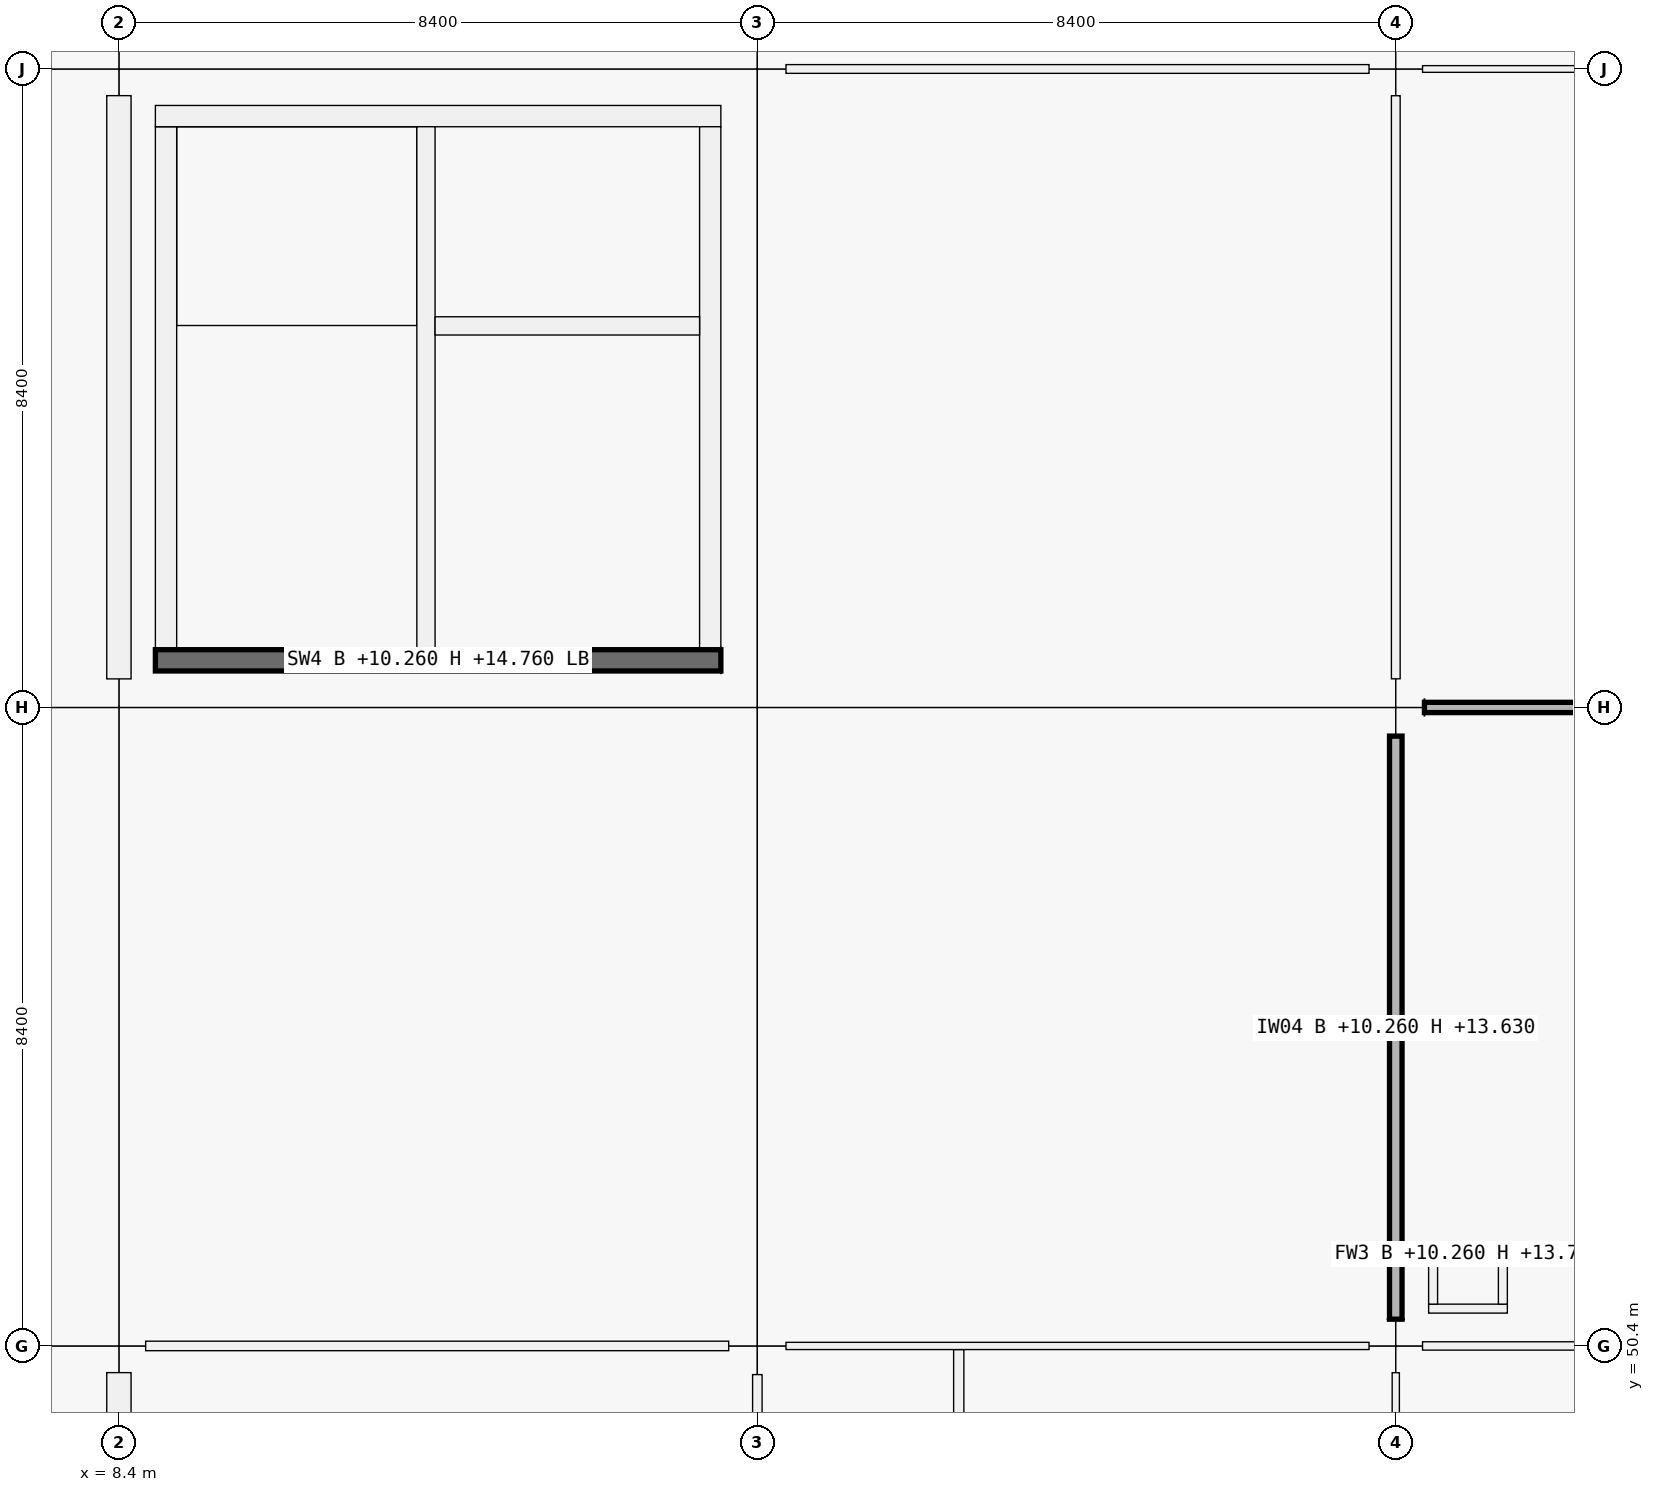
"""IFC4 building model, lengths in metres.
Left out: names, types, materials, properties, quantities, classifications, styles, units other than length and angle.
Written with IfcOpenShell. Run it as: python <this file> out.ifc"""

import sys

from ifc_helpers import new_model, si_unit, direction, frame, frame_2d, origin, origin_2d, place, context, subcontext, project, spatial, rectangle, extrude, element, fill, save


model = new_model("IFC4")
c1 = context("Model", 3, precision=1e-05, world=origin(), true_north=direction((0.0, 1.0)))
c2 = subcontext(c1, "Body", "Model", "MODEL_VIEW")
j1 = project(units=[si_unit("LENGTHUNIT", "METRE"), si_unit("PLANEANGLEUNIT", "RADIAN")], contexts=[c1])
p1 = place(None, origin())
s1 = spatial("IfcSite", under=j1, at=p1, CompositionType="ELEMENT")
p2 = place(p1, origin())
s2 = spatial("IfcBuilding", under=s1, at=p2, CompositionType="ELEMENT")
p3 = place(p2, frame((0.0, 0.0, 10.26)))
s3 = spatial("IfcBuildingStorey", under=s2, at=p3, CompositionType="ELEMENT", Elevation=10.26)
p4 = place(p3, frame((8.4, 50.4, 0.0), z_axis=(0.0, 0.0, 1.0), x_axis=(1.0, 0.0, 0.0)))
e1 = element("IfcColumn", 1, at=p4, inside=s3, PredefinedType="COLUMN", context=c2, shape_type="SweptSolid", body=[
    extrude(rectangle(XDim=0.7, YDim=0.7, at=origin_2d()), origin(), (0.0, 0.0, 1.0), 4.5),
])
p5 = place(p3, frame((8.4, 58.8, 0.0), z_axis=(0.0, 0.0, 1.0), x_axis=(1.0, 0.0, 0.0)))
e2 = element("IfcColumn", 2, at=p5, inside=s3, PredefinedType="COLUMN", context=c2, shape_type="SweptSolid", body=[
    extrude(rectangle(XDim=0.75, YDim=0.75, at=origin_2d()), origin(), (0.0, 0.0, 1.0), 4.5),
])
p6 = place(p3, frame((8.4, 67.2, 0.0), z_axis=(0.0, 0.0, 1.0), x_axis=(1.0, 0.0, 0.0)))
e3 = element("IfcColumn", 3, at=p6, inside=s3, PredefinedType="COLUMN", context=c2, shape_type="SweptSolid", body=[
    extrude(rectangle(XDim=0.7, YDim=0.7, at=origin_2d()), origin(), (0.0, 0.0, 1.0), 4.5),
])
p7 = place(p3, frame((16.8, 50.4, 0.0), z_axis=(0.0, 0.0, 1.0), x_axis=(1.0, 0.0, 0.0)))
e4 = element("IfcColumn", 4, at=p7, inside=s3, PredefinedType="COLUMN", context=c2, shape_type="SweptSolid", body=[
    extrude(rectangle(XDim=0.75, YDim=0.75, at=origin_2d()), origin(), (0.0, 0.0, 1.0), 4.5),
])
p8 = place(p3, frame((16.8, 58.8, 0.0), z_axis=(0.0, 0.0, 1.0), x_axis=(1.0, 0.0, 0.0)))
e5 = element("IfcColumn", 5, at=p8, inside=s3, PredefinedType="COLUMN", context=c2, shape_type="SweptSolid", body=[
    extrude(rectangle(XDim=0.7, YDim=0.7, at=origin_2d()), origin(), (0.0, 0.0, 1.0), 4.5),
])
p9 = place(p3, frame((16.8, 67.2, 0.0), z_axis=(0.0, 0.0, 1.0), x_axis=(1.0, 0.0, 0.0)))
e6 = element("IfcColumn", 6, at=p9, inside=s3, PredefinedType="COLUMN", context=c2, shape_type="SweptSolid", body=[
    extrude(rectangle(XDim=0.75, YDim=0.75, at=origin_2d()), origin(), (0.0, 0.0, 1.0), 4.5),
])
p10 = place(p3, frame((25.2, 50.4, 0.0), z_axis=(0.0, 0.0, 1.0), x_axis=(1.0, 0.0, 0.0)))
e7 = element("IfcColumn", 7, at=p10, inside=s3, PredefinedType="COLUMN", context=c2, shape_type="SweptSolid", body=[
    extrude(rectangle(XDim=0.7, YDim=0.7, at=origin_2d()), origin(), (0.0, 0.0, 1.0), 4.5),
])
p11 = place(p3, frame((25.2, 58.8, 0.0), z_axis=(0.0, 0.0, 1.0), x_axis=(1.0, 0.0, 0.0)))
e8 = element("IfcColumn", 8, at=p11, inside=s3, PredefinedType="COLUMN", context=c2, shape_type="SweptSolid", body=[
    extrude(rectangle(XDim=0.75, YDim=0.75, at=origin_2d()), origin(), (0.0, 0.0, 1.0), 4.5),
])
p12 = place(p3, frame((25.2, 67.2, 0.0), z_axis=(0.0, 0.0, 1.0), x_axis=(1.0, 0.0, 0.0)))
e9 = element("IfcColumn", 9, at=p12, inside=s3, PredefinedType="COLUMN", context=c2, shape_type="SweptSolid", body=[
    extrude(rectangle(XDim=0.7, YDim=0.7, at=origin_2d()), origin(), (0.0, 0.0, 1.0), 4.5),
])
p13 = place(p3, frame((8.4, 42.376, 0.0), z_axis=(0.0, 0.0, 1.0), x_axis=(0.0, 1.0, 0.0)))
e10 = element("IfcWall", 10, at=p13, inside=s3, PredefinedType="SOLIDWALL", context=c2, shape_type="SweptSolid", body=[
    extrude(rectangle(XDim=7.673, YDim=0.32, at=frame_2d((3.836, 0.0))), origin(), (0.0, 0.0, 1.0), 3.54),
])
p14 = place(p13, frame((2.937, 0.0, 0.9)))
e11 = element("IfcOpeningElement", 11, at=p14, cuts=e10, PredefinedType="OPENING", context=c2, shape_type="SweptSolid", body=[
    extrude(rectangle(XDim=1.8, YDim=1.8, at=frame_2d((0.9, 0.9))), frame((0.0, 0.16, 0.0), z_axis=(0.0, -1.0, 0.0), x_axis=(1.0, 0.0, 0.0)), (0.0, 0.0, 1.0), 0.32),
])
p15 = place(p3, frame((8.4, 59.176, 0.0), z_axis=(0.0, 0.0, 1.0), x_axis=(0.0, 1.0, 0.0)))
e12 = element("IfcWall", 12, at=p15, inside=s3, PredefinedType="SOLIDWALL", context=c2, shape_type="SweptSolid", body=[
    extrude(rectangle(XDim=7.673, YDim=0.32, at=frame_2d((3.836, 0.0))), origin(), (0.0, 0.0, 1.0), 3.54),
])
p16 = place(p3, frame((16.32, 59.42, 0.0), z_axis=(0.0, 0.0, 1.0), x_axis=(-1.0, 0.0, 0.0)))
e13 = element("IfcWall", 13, at=p16, inside=s3, PredefinedType="SHEAR", context=c2, shape_type="SweptSolid", body=[
    extrude(rectangle(XDim=7.44, YDim=0.28, at=frame_2d((3.72, 0.0))), origin(), (0.0, 0.0, 1.0), 4.5),
])
p17 = place(p16, frame((1.28, 0.0, 0.0)))
e14 = element("IfcOpeningElement", 14, at=p17, cuts=e13, PredefinedType="OPENING", context=c2, shape_type="SweptSolid", body=[
    extrude(rectangle(XDim=1.5, YDim=2.15, at=frame_2d((0.75, 1.075))), frame((0.0, 0.14, 0.0), z_axis=(0.0, -1.0, 0.0), x_axis=(1.0, 0.0, 0.0)), (0.0, 0.0, 1.0), 0.28),
])
p18 = place(p3, frame((9.02, 59.56, 0.0), z_axis=(0.0, 0.0, 1.0), x_axis=(0.0, 1.0, 0.0)))
e15 = element("IfcWall", 15, at=p18, inside=s3, PredefinedType="SHEAR", context=c2, shape_type="SweptSolid", body=[
    extrude(rectangle(XDim=6.88, YDim=0.28, at=frame_2d((3.44, 0.0))), origin(), (0.0, 0.0, 1.0), 4.5),
])
p19 = place(p3, frame((8.88, 66.58, 0.0), z_axis=(0.0, 0.0, 1.0), x_axis=(1.0, 0.0, 0.0)))
e16 = element("IfcWall", 16, at=p19, inside=s3, PredefinedType="SHEAR", context=c2, shape_type="SweptSolid", body=[
    extrude(rectangle(XDim=7.44, YDim=0.28, at=frame_2d((3.72, 0.0))), origin(), (0.0, 0.0, 1.0), 4.5),
])
p20 = place(p3, frame((16.18, 66.44, 0.0), z_axis=(0.0, 0.0, 1.0), x_axis=(0.0, -1.0, 0.0)))
e17 = element("IfcWall", 17, at=p20, inside=s3, PredefinedType="SHEAR", context=c2, shape_type="SweptSolid", body=[
    extrude(rectangle(XDim=6.88, YDim=0.28, at=frame_2d((3.44, 0.0))), origin(), (0.0, 0.0, 1.0), 4.5),
])
p21 = place(p3, frame((12.44, 59.56, 0.0), z_axis=(0.0, 0.0, 1.0), x_axis=(0.0, 1.0, 0.0)))
e18 = element("IfcWall", 18, at=p21, inside=s3, PredefinedType="SHEAR", context=c2, shape_type="SweptSolid", body=[
    extrude(rectangle(XDim=6.88, YDim=0.24, at=frame_2d((3.44, 0.0))), origin(), (0.0, 0.0, 1.0), 4.5),
])
p22 = place(p21, frame((0.12, 0.0, 0.0)))
e19 = element("IfcOpeningElement", 19, at=p22, cuts=e18, PredefinedType="OPENING", context=c2, shape_type="SweptSolid", body=[
    extrude(rectangle(XDim=1.0, YDim=2.15, at=frame_2d((0.5, 1.075))), frame((0.0, 0.12, 0.0), z_axis=(0.0, -1.0, 0.0), x_axis=(1.0, 0.0, 0.0)), (0.0, 0.0, 1.0), 0.24),
])
p23 = place(p3, frame((12.56, 63.82, 0.0), z_axis=(0.0, 0.0, 1.0), x_axis=(1.0, 0.0, 0.0)))
e20 = element("IfcWall", 20, at=p23, inside=s3, PredefinedType="SHEAR", context=c2, shape_type="SweptSolid", body=[
    extrude(rectangle(XDim=3.48, YDim=0.24, at=frame_2d((1.74, 0.0))), origin(), (0.0, 0.0, 1.0), 4.5),
])
p24 = place(p23, frame((1.19, 0.0, 0.0)))
e21 = element("IfcOpeningElement", 21, at=p24, cuts=e20, PredefinedType="OPENING", context=c2, shape_type="SweptSolid", body=[
    extrude(rectangle(XDim=1.1, YDim=2.15, at=frame_2d((0.55, 1.075))), frame((0.0, 0.12, 0.0), z_axis=(0.0, -1.0, 0.0), x_axis=(1.0, 0.0, 0.0)), (0.0, 0.0, 1.0), 0.24),
])
for number, where, z_axis, x_axis in (
    (22, (25.632, 50.891, 0.0), (0.0, 0.0, 1.0), (1.0, 0.0, 0.0)),
    (23, (25.632, 51.609, 0.0), (0.0, 0.0, 1.0), (1.0, 0.0, 0.0)),
):
    element("IfcWall", number, at=place(p3, frame(where, z_axis=z_axis, x_axis=x_axis)), inside=s3, PredefinedType="PARTITIONING", context=c2, shape_type="SweptSolid", body=[
        extrude(rectangle(XDim=1.036, YDim=0.118, at=frame_2d((0.518, 0.0))), origin(), (0.0, 0.0, 1.0), 3.53),
    ])
for number, where, z_axis, x_axis in (
    (24, (25.691, 50.95, 0.0), (0.0, 0.0, 1.0), (0.0, 1.0, 0.0)),
    (25, (26.609, 50.95, 0.0), (0.0, 0.0, 1.0), (0.0, 1.0, 0.0)),
):
    element("IfcWall", number, at=place(p3, frame(where, z_axis=z_axis, x_axis=x_axis)), inside=s3, PredefinedType="PARTITIONING", context=c2, shape_type="SweptSolid", body=[
        extrude(rectangle(XDim=0.6, YDim=0.118, at=frame_2d((0.3, 0.0))), origin(), (0.0, 0.0, 1.0), 3.53),
    ])
p25 = place(p3, frame((8.752, 50.4, 0.0), z_axis=(0.0, 0.0, 1.0), x_axis=(1.0, 0.0, 0.0)))
e26 = element("IfcWall", 26, at=p25, inside=s3, PredefinedType="PARTITIONING", context=c2, shape_type="SweptSolid", body=[
    extrude(rectangle(XDim=7.671, YDim=0.125, at=frame_2d((3.835, 0.0))), origin(), (0.0, 0.0, 1.0), 3.37),
])
p26 = place(p25, frame((3.296, 0.0, 0.0)))
e27 = element("IfcOpeningElement", 27, at=p26, cuts=e26, PredefinedType="OPENING", context=c2, shape_type="SweptSolid", body=[
    extrude(rectangle(XDim=1.08, YDim=2.25, at=frame_2d((0.54, 1.125))), frame((0.0, 0.062, 0.0), z_axis=(0.0, -1.0, 0.0), x_axis=(1.0, 0.0, 0.0)), (0.0, 0.0, 1.0), 0.125),
])
p27 = place(p3, frame((17.177, 50.4, 0.0), z_axis=(0.0, 0.0, 1.0), x_axis=(1.0, 0.0, 0.0)))
e28 = element("IfcWall", 28, at=p27, inside=s3, PredefinedType="PARTITIONING", context=c2, shape_type="SweptSolid", body=[
    extrude(rectangle(XDim=7.671, YDim=0.095, at=frame_2d((3.835, 0.0))), origin(), (0.0, 0.0, 1.0), 3.37),
])
p28 = place(p27, frame((0.608, 0.0, 0.0)))
e29 = element("IfcOpeningElement", 29, at=p28, cuts=e28, PredefinedType="OPENING", context=c2, shape_type="SweptSolid", body=[
    extrude(rectangle(XDim=0.96, YDim=2.1, at=frame_2d((0.48, 1.05))), frame((0.0, 0.047, 0.0), z_axis=(0.0, -1.0, 0.0), x_axis=(1.0, 0.0, 0.0)), (0.0, 0.0, 1.0), 0.095),
])
p29 = place(p27, frame((4.548, 0.0, 0.0)))
e30 = element("IfcOpeningElement", 30, at=p29, cuts=e28, PredefinedType="OPENING", context=c2, shape_type="SweptSolid", body=[
    extrude(rectangle(XDim=0.92, YDim=2.1, at=frame_2d((0.46, 1.05))), frame((0.0, 0.047, 0.0), z_axis=(0.0, -1.0, 0.0), x_axis=(1.0, 0.0, 0.0)), (0.0, 0.0, 1.0), 0.095),
])
p30 = place(p3, frame((17.177, 67.2, 0.0), z_axis=(0.0, 0.0, 1.0), x_axis=(1.0, 0.0, 0.0)))
e31 = element("IfcWall", 31, at=p30, inside=s3, PredefinedType="PARTITIONING", context=c2, shape_type="SweptSolid", body=[
    extrude(rectangle(XDim=7.671, YDim=0.115, at=frame_2d((3.835, 0.0))), origin(), (0.0, 0.0, 1.0), 3.37),
])
p31 = place(p30, frame((3.316, 0.0, 0.0)))
e32 = element("IfcOpeningElement", 32, at=p31, cuts=e31, PredefinedType="OPENING", context=c2, shape_type="SweptSolid", body=[
    extrude(rectangle(XDim=1.04, YDim=2.2, at=frame_2d((0.52, 1.1))), frame((0.0, 0.058, 0.0), z_axis=(0.0, -1.0, 0.0), x_axis=(1.0, 0.0, 0.0)), (0.0, 0.0, 1.0), 0.115),
])
p32 = place(p3, frame((25.552, 50.4, 0.0), z_axis=(0.0, 0.0, 1.0), x_axis=(1.0, 0.0, 0.0)))
e33 = element("IfcWall", 33, at=p32, inside=s3, PredefinedType="MOVABLE", context=c2, shape_type="SweptSolid", body=[
    extrude(rectangle(XDim=7.671, YDim=0.11, at=frame_2d((3.835, 0.0))), origin(), (0.0, 0.0, 1.0), 3.37),
])
p33 = place(p32, frame((3.296, 0.0, 0.0)))
e34 = element("IfcOpeningElement", 34, at=p33, cuts=e33, PredefinedType="OPENING", context=c2, shape_type="SweptSolid", body=[
    extrude(rectangle(XDim=1.08, YDim=2.25, at=frame_2d((0.54, 1.125))), frame((0.0, 0.055, 0.0), z_axis=(0.0, -1.0, 0.0), x_axis=(1.0, 0.0, 0.0)), (0.0, 0.0, 1.0), 0.11),
])
p34 = place(p3, frame((25.577, 58.8, 0.0), z_axis=(0.0, 0.0, 1.0), x_axis=(1.0, 0.0, 0.0)))
e35 = element("IfcWall", 35, at=p34, inside=s3, PredefinedType="PARTITIONING", context=c2, shape_type="SweptSolid", body=[
    extrude(rectangle(XDim=7.671, YDim=0.135, at=frame_2d((3.835, 0.0))), origin(), (0.0, 0.0, 1.0), 3.37),
])
p35 = place(p34, frame((3.306, 0.0, 0.0)))
e36 = element("IfcOpeningElement", 36, at=p35, cuts=e35, PredefinedType="OPENING", context=c2, shape_type="SweptSolid", body=[
    extrude(rectangle(XDim=1.06, YDim=2.25, at=frame_2d((0.53, 1.125))), frame((0.0, 0.067, 0.0), z_axis=(0.0, -1.0, 0.0), x_axis=(1.0, 0.0, 0.0)), (0.0, 0.0, 1.0), 0.135),
])
p36 = place(p3, frame((25.552, 67.2, 0.0), z_axis=(0.0, 0.0, 1.0), x_axis=(1.0, 0.0, 0.0)))
e37 = element("IfcWall", 37, at=p36, inside=s3, PredefinedType="PARTITIONING", context=c2, shape_type="SweptSolid", body=[
    extrude(rectangle(XDim=7.671, YDim=0.088, at=frame_2d((3.835, 0.0))), origin(), (0.0, 0.0, 1.0), 3.37),
])
p37 = place(p36, frame((3.316, 0.0, 0.0)))
e38 = element("IfcOpeningElement", 38, at=p37, cuts=e37, PredefinedType="OPENING", context=c2, shape_type="SweptSolid", body=[
    extrude(rectangle(XDim=1.04, YDim=2.2, at=frame_2d((0.52, 1.1))), frame((0.0, 0.044, 0.0), z_axis=(0.0, -1.0, 0.0), x_axis=(1.0, 0.0, 0.0)), (0.0, 0.0, 1.0), 0.088),
])
p38 = place(p3, frame((16.8, 42.352, 0.0), z_axis=(0.0, 0.0, 1.0), x_axis=(0.0, 1.0, 0.0)))
e39 = element("IfcWall", 39, at=p38, inside=s3, PredefinedType="PARTITIONING", context=c2, shape_type="SweptSolid", body=[
    extrude(rectangle(XDim=7.671, YDim=0.125, at=frame_2d((3.835, 0.0))), origin(), (0.0, 0.0, 1.0), 3.37),
])
p39 = place(p3, frame((25.2, 42.377, 0.0), z_axis=(0.0, 0.0, 1.0), x_axis=(0.0, 1.0, 0.0)))
e40 = element("IfcWall", 40, at=p39, inside=s3, PredefinedType="PARTITIONING", context=c2, shape_type="SweptSolid", body=[
    extrude(rectangle(XDim=7.671, YDim=0.095, at=frame_2d((3.835, 0.0))), origin(), (0.0, 0.0, 1.0), 3.37),
])
p40 = place(p3, frame((25.2, 50.752, 0.0), z_axis=(0.0, 0.0, 1.0), x_axis=(0.0, 1.0, 0.0)))
e41 = element("IfcWall", 41, at=p40, inside=s3, PredefinedType="PARTITIONING", context=c2, shape_type="SweptSolid", body=[
    extrude(rectangle(XDim=7.671, YDim=0.165, at=frame_2d((3.835, 0.0))), origin(), (0.0, 0.0, 1.0), 3.37),
])
p41 = place(p40, frame((3.306, 0.0, 0.0)))
e42 = element("IfcOpeningElement", 42, at=p41, cuts=e41, PredefinedType="OPENING", context=c2, shape_type="SweptSolid", body=[
    extrude(rectangle(XDim=1.06, YDim=2.25, at=frame_2d((0.53, 1.125))), frame((0.0, 0.083, 0.0), z_axis=(0.0, -1.0, 0.0), x_axis=(1.0, 0.0, 0.0)), (0.0, 0.0, 1.0), 0.165),
])
p42 = place(p3, frame((25.2, 59.177, 0.0), z_axis=(0.0, 0.0, 1.0), x_axis=(0.0, 1.0, 0.0)))
e43 = element("IfcWall", 43, at=p42, inside=s3, PredefinedType="PARTITIONING", context=c2, shape_type="SweptSolid", body=[
    extrude(rectangle(XDim=7.671, YDim=0.115, at=frame_2d((3.835, 0.0))), origin(), (0.0, 0.0, 1.0), 3.37),
])
p43 = place(p42, frame((3.316, 0.0, 0.0)))
e44 = element("IfcOpeningElement", 44, at=p43, cuts=e43, PredefinedType="OPENING", context=c2, shape_type="SweptSolid", body=[
    extrude(rectangle(XDim=1.04, YDim=2.2, at=frame_2d((0.52, 1.1))), frame((0.0, 0.058, 0.0), z_axis=(0.0, -1.0, 0.0), x_axis=(1.0, 0.0, 0.0)), (0.0, 0.0, 1.0), 0.115),
])
p44 = place(p3, frame((19.45, 42.074, 0.0), z_axis=(0.0, 0.0, 1.0), x_axis=(0.0, 1.0, 0.0)))
e45 = element("IfcWall", 45, at=p44, inside=s3, PredefinedType="PARTITIONING", context=c2, shape_type="SweptSolid", body=[
    extrude(rectangle(XDim=8.276, YDim=0.135, at=frame_2d((4.138, 0.0))), origin(), (0.0, 0.0, 1.0), 3.37),
])
p45 = place(p22, origin())
e46 = element("IfcDoor", 46, at=p45, inside=s3, OperationType="SINGLE_SWING_LEFT", PredefinedType="DOOR", context=c2, shape_type="SweptSolid", body=[
    extrude(rectangle(XDim=1.0, YDim=2.15, at=frame_2d((0.5, 1.075))), frame((0.0, 0.025, 0.0), z_axis=(0.0, -1.0, 0.0), x_axis=(1.0, 0.0, 0.0)), (0.0, 0.0, 1.0), 0.05),
])
fill(e19, e46)
p46 = place(p17, origin())
e47 = element("IfcDoor", 47, at=p46, inside=s3, OperationType="DOUBLE_DOOR_SINGLE_SWING", PredefinedType="DOOR", context=c2, shape_type="SweptSolid", body=[
    extrude(rectangle(XDim=1.5, YDim=2.15, at=frame_2d((0.75, 1.075))), frame((0.0, 0.025, 0.0), z_axis=(0.0, -1.0, 0.0), x_axis=(1.0, 0.0, 0.0)), (0.0, 0.0, 1.0), 0.05),
])
fill(e14, e47)
p47 = place(p24, origin())
e48 = element("IfcDoor", 48, at=p47, inside=s3, OperationType="DOUBLE_DOOR_SLIDING", PredefinedType="DOOR", context=c2, shape_type="SweptSolid", body=[
    extrude(rectangle(XDim=1.1, YDim=2.15, at=frame_2d((0.55, 1.075))), frame((0.0, 0.025, 0.0), z_axis=(0.0, -1.0, 0.0), x_axis=(1.0, 0.0, 0.0)), (0.0, 0.0, 1.0), 0.05),
])
fill(e21, e48)
p48 = place(p28, origin())
e49 = element("IfcDoor", 49, at=p48, inside=s3, OperationType="SINGLE_SWING_RIGHT", PredefinedType="DOOR", context=c2, shape_type="SweptSolid", body=[
    extrude(rectangle(XDim=0.96, YDim=2.1, at=frame_2d((0.48, 1.05))), frame((0.0, 0.025, 0.0), z_axis=(0.0, -1.0, 0.0), x_axis=(1.0, 0.0, 0.0)), (0.0, 0.0, 1.0), 0.05),
])
fill(e29, e49)
p49 = place(p29, origin())
e50 = element("IfcDoor", 50, at=p49, inside=s3, OperationType="SINGLE_SWING_LEFT", PredefinedType="DOOR", context=c2, shape_type="SweptSolid", body=[
    extrude(rectangle(XDim=0.92, YDim=2.1, at=frame_2d((0.46, 1.05))), frame((0.0, 0.025, 0.0), z_axis=(0.0, -1.0, 0.0), x_axis=(1.0, 0.0, 0.0)), (0.0, 0.0, 1.0), 0.05),
])
fill(e30, e50)
p50 = place(p26, origin())
e51 = element("IfcDoor", 51, at=p50, inside=s3, OperationType="SINGLE_SWING_LEFT", PredefinedType="DOOR", context=c2, shape_type="SweptSolid", body=[
    extrude(rectangle(XDim=1.08, YDim=2.25, at=frame_2d((0.54, 1.125))), frame((0.0, 0.025, 0.0), z_axis=(0.0, -1.0, 0.0), x_axis=(1.0, 0.0, 0.0)), (0.0, 0.0, 1.0), 0.05),
])
fill(e27, e51)
p51 = place(p31, origin())
e52 = element("IfcDoor", 52, at=p51, inside=s3, OperationType="SINGLE_SWING_LEFT", PredefinedType="DOOR", context=c2, shape_type="SweptSolid", body=[
    extrude(rectangle(XDim=1.04, YDim=2.2, at=frame_2d((0.52, 1.1))), frame((0.0, 0.025, 0.0), z_axis=(0.0, -1.0, 0.0), x_axis=(1.0, 0.0, 0.0)), (0.0, 0.0, 1.0), 0.05),
])
fill(e32, e52)
p52 = place(p41, origin())
e53 = element("IfcDoor", 53, at=p52, inside=s3, OperationType="SINGLE_SWING_LEFT", PredefinedType="DOOR", context=c2, shape_type="SweptSolid", body=[
    extrude(rectangle(XDim=1.06, YDim=2.25, at=frame_2d((0.53, 1.125))), frame((0.0, 0.025, 0.0), z_axis=(0.0, -1.0, 0.0), x_axis=(1.0, 0.0, 0.0)), (0.0, 0.0, 1.0), 0.05),
])
fill(e42, e53)
p53 = place(p43, origin())
e54 = element("IfcDoor", 54, at=p53, inside=s3, OperationType="SINGLE_SWING_RIGHT", PredefinedType="DOOR", context=c2, shape_type="SweptSolid", body=[
    extrude(rectangle(XDim=1.04, YDim=2.2, at=frame_2d((0.52, 1.1))), frame((0.0, 0.025, 0.0), z_axis=(0.0, -1.0, 0.0), x_axis=(1.0, 0.0, 0.0)), (0.0, 0.0, 1.0), 0.05),
])
fill(e44, e54)
save(model, sys.argv[1])
